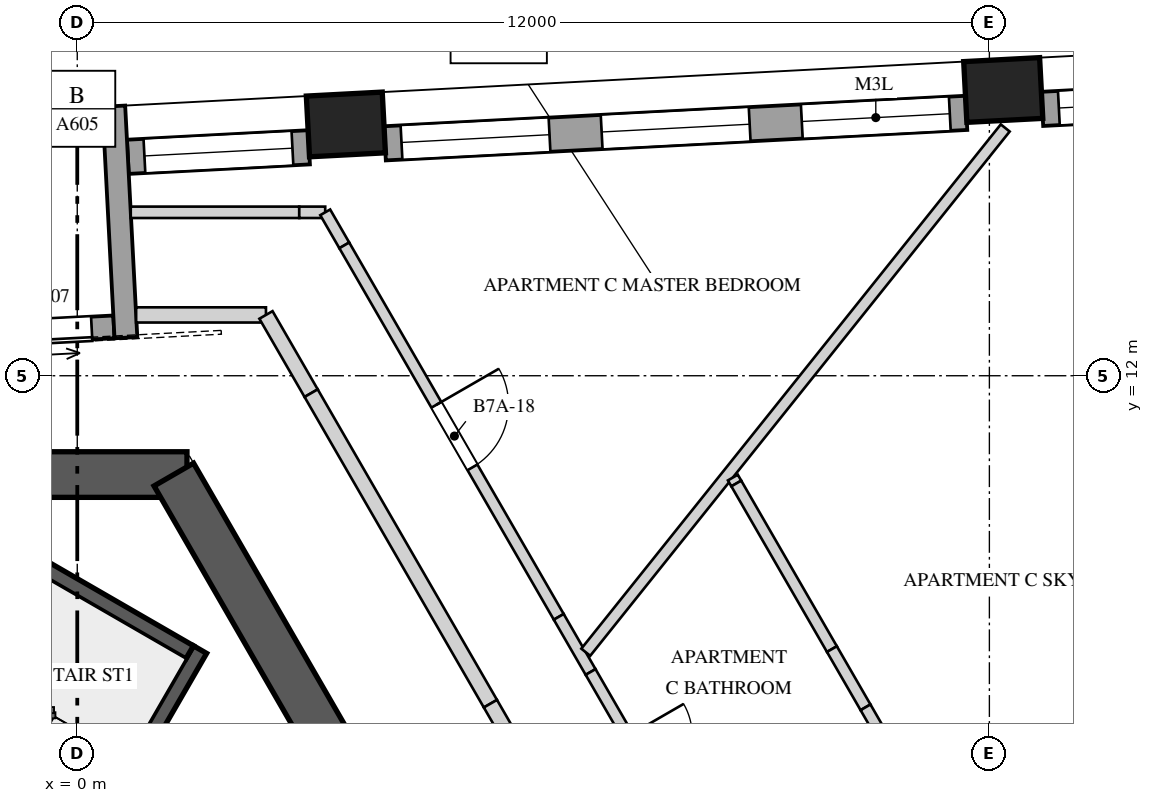
"""IFC4 building model, lengths in metres.
Left out: names, types, materials, properties, quantities, classifications, styles, units other than length and angle.
Written with IfcOpenShell. Run it as: python <this file> out.ifc"""

import sys

from ifc_helpers import new_model, si_unit, direction, frame, frame_2d, origin, origin_2d, place, context, subcontext, project, spatial, rectangle, extrude, element, fill, save


model = new_model("IFC4")
c1 = context("Model", 3, precision=1e-05, world=origin(), true_north=direction((0.0, 1.0)))
c2 = subcontext(c1, "Body", "Model", "MODEL_VIEW")
j1 = project(units=[si_unit("LENGTHUNIT", "METRE"), si_unit("PLANEANGLEUNIT", "RADIAN")], contexts=[c1])
p1 = place(None, origin())
s1 = spatial("IfcSite", under=j1, at=p1, CompositionType="ELEMENT")
p2 = place(p1, origin())
s2 = spatial("IfcBuilding", under=s1, at=p2, CompositionType="ELEMENT")
p3 = place(p2, frame((0.0, 0.0, 274.4)))
s3 = spatial("IfcBuildingStorey", under=s2, at=p3, CompositionType="ELEMENT", Elevation=274.4)
p4 = place(p3, frame((1.443, 10.7, 0.0), z_axis=(0.0, 0.0, 1.0), x_axis=(-1.0, 0.0, 0.0)))
e1 = element("IfcWall", 1, at=p4, inside=s3, PredefinedType="SHEAR", context=c2, shape_type="SweptSolid", body=[
    extrude(rectangle(XDim=2.887, YDim=0.6, at=frame_2d((1.443, 0.0))), origin(), (0.0, 0.0, 1.0), 4.0),
])
p5 = place(p3, frame((9.902, -4.25, 0.0), z_axis=(0.0, 0.0, 1.0), x_axis=(-0.499999536116, 0.866025671608, 0.0)))
e2 = element("IfcWall", 2, at=p5, inside=s3, PredefinedType="SHEAR", context=c2, shape_type="SweptSolid", body=[
    extrude(rectangle(XDim=17.263, YDim=0.6, at=frame_2d((8.631, 0.0))), origin(), (0.0, 0.0, 1.0), 4.0),
])
p6 = place(p5, frame((6.906, 0.0, 0.0)))
e3 = element("IfcOpeningElement", 3, at=p6, cuts=e2, PredefinedType="OPENING", context=c2, shape_type="SweptSolid", body=[
    extrude(rectangle(XDim=1.0, YDim=2.4, at=frame_2d((0.5, 1.2))), frame((0.0, 0.31, 0.0), z_axis=(0.0, -1.0, 0.0), x_axis=(1.0, 0.0, 0.0)), (0.0, 0.0, 1.0), 0.62),
])
for number, where, z_axis, x_axis in (
    (4, (12.182, 15.759, -0.35), (0.0, 0.0, 1.0), (-0.999, -0.052, 0.0)),
    (5, (3.534, 15.306, -0.35), (0.0, 0.0, 1.0), (-0.999, -0.052, 0.0)),
):
    element("IfcColumn", number, at=place(p3, frame(where, z_axis=z_axis, x_axis=x_axis)), inside=s3, PredefinedType="COLUMN", context=c2, shape_type="SweptSolid", body=[
        extrude(rectangle(XDim=1.0, YDim=0.8, at=origin_2d()), origin(), (0.0, 0.0, 1.0), 4.35),
    ])
p7 = place(p3, frame((15.08, 15.636, 0.0), z_axis=(0.0, 0.0, 1.0), x_axis=(-0.998627701279, -0.052370929331, 0.0)))
e6 = element("IfcWall", 6, at=p7, inside=s3, PredefinedType="SOLIDWALL", context=c2, shape_type="SweptSolid", body=[
    extrude(rectangle(XDim=2.387, YDim=0.45, at=frame_2d((1.193, 0.0))), origin(), (0.0, 0.0, 1.0), 3.3),
])
p8 = place(p7, frame((0.218, 0.0, 0.4)))
e7 = element("IfcOpeningElement", 7, at=p8, cuts=e6, PredefinedType="OPENING", context=c2, shape_type="SweptSolid", body=[
    extrude(rectangle(XDim=1.95, YDim=2.75, at=frame_2d((0.975, 1.375))), frame((0.0, 0.235, 0.0), z_axis=(0.0, -1.0, 0.0), x_axis=(1.0, 0.0, 0.0)), (0.0, 0.0, 1.0), 0.47),
])
p9 = place(p3, frame((11.697, 15.458, 0.0), z_axis=(0.0, 0.0, 1.0), x_axis=(-0.998628023429, -0.052364786088, 0.0)))
e8 = element("IfcWall", 8, at=p9, inside=s3, PredefinedType="SOLIDWALL", context=c2, shape_type="SweptSolid", body=[
    extrude(rectangle(XDim=7.66, YDim=0.45, at=frame_2d((3.83, 0.0))), origin(), (0.0, 0.0, 1.0), 3.3),
])
p10 = place(p9, frame((0.218, 0.0, 0.4)))
e9 = element("IfcOpeningElement", 9, at=p10, cuts=e8, PredefinedType="OPENING", context=c2, shape_type="SweptSolid", body=[
    extrude(rectangle(XDim=1.95, YDim=2.1, at=frame_2d((0.975, 1.05))), frame((0.0, 0.235, 0.0), z_axis=(0.0, -1.0, 0.0), x_axis=(1.0, 0.0, 0.0)), (0.0, 0.0, 1.0), 0.47),
])
p11 = place(p9, frame((2.855, 0.0, 0.4)))
e10 = element("IfcOpeningElement", 10, at=p11, cuts=e8, PredefinedType="OPENING", context=c2, shape_type="SweptSolid", body=[
    extrude(rectangle(XDim=1.95, YDim=2.75, at=frame_2d((0.975, 1.375))), frame((0.0, 0.235, 0.0), z_axis=(0.0, -1.0, 0.0), x_axis=(1.0, 0.0, 0.0)), (0.0, 0.0, 1.0), 0.47),
])
p12 = place(p9, frame((5.492, 0.0, 0.4)))
e11 = element("IfcOpeningElement", 11, at=p12, cuts=e8, PredefinedType="OPENING", context=c2, shape_type="SweptSolid", body=[
    extrude(rectangle(XDim=1.95, YDim=2.75, at=frame_2d((0.975, 1.375))), frame((0.0, 0.235, 0.0), z_axis=(0.0, -1.0, 0.0), x_axis=(1.0, 0.0, 0.0)), (0.0, 0.0, 1.0), 0.47),
])
p13 = place(p3, frame((3.049, 15.005, 0.0), z_axis=(0.0, 0.0, 1.0), x_axis=(-0.998627701279, -0.052370929331, 0.0)))
e12 = element("IfcWall", 12, at=p13, inside=s3, PredefinedType="SOLIDWALL", context=c2, shape_type="SweptSolid", body=[
    extrude(rectangle(XDim=2.387, YDim=0.45, at=frame_2d((1.193, 0.0))), origin(), (0.0, 0.0, 1.0), 3.3),
])
p14 = place(p13, frame((0.218, 0.0, 0.4)))
e13 = element("IfcOpeningElement", 13, at=p14, cuts=e12, PredefinedType="OPENING", context=c2, shape_type="SweptSolid", body=[
    extrude(rectangle(XDim=1.95, YDim=2.75, at=frame_2d((0.975, 1.375))), frame((0.0, 0.235, 0.0), z_axis=(0.0, -1.0, 0.0), x_axis=(1.0, 0.0, 0.0)), (0.0, 0.0, 1.0), 0.47),
])
p15 = place(p3, frame((0.482, 12.643, 0.0), z_axis=(0.0, 0.0, 1.0), x_axis=(-0.998630775221, -0.052312281362, 0.0)))
e14 = element("IfcWall", 14, at=p15, inside=s3, PredefinedType="SOLIDWALL", context=c2, shape_type="SweptSolid", body=[
    extrude(rectangle(XDim=2.287, YDim=0.3, at=frame_2d((1.144, 0.0))), origin(), (0.0, 0.0, 1.0), 3.3),
])
p16 = place(p15, frame((0.293, 0.0, 0.0)))
e15 = element("IfcOpeningElement", 15, at=p16, cuts=e14, PredefinedType="OPENING", context=c2, shape_type="SweptSolid", body=[
    extrude(rectangle(XDim=1.7, YDim=2.5, at=frame_2d((0.85, 1.25))), frame((0.0, 0.16, 0.0), z_axis=(0.0, -1.0, 0.0), x_axis=(1.0, 0.0, 0.0)), (0.0, 0.0, 1.0), 0.32),
])
p17 = place(p3, frame((0.48, 15.546, 0.0), z_axis=(0.0, 0.0, 1.0), x_axis=(0.052352956549, -0.998628643661, 0.0)))
e16 = element("IfcWall", 16, at=p17, inside=s3, PredefinedType="SOLIDWALL", context=c2, shape_type="SweptSolid", body=[
    extrude(rectangle(XDim=3.05, YDim=0.3, at=frame_2d((1.525, 0.0))), origin(), (0.0, 0.0, 1.0), 3.3),
])
p18 = place(p3, frame((1.615, 8.397, 0.0), z_axis=(0.0, 0.0, 1.0), x_axis=(-0.500009909098, -0.866019682689, 0.0)))
e17 = element("IfcWall", 17, at=p18, inside=s3, PredefinedType="SOLIDWALL", context=c2, shape_type="SweptSolid", body=[
    extrude(rectangle(XDim=6.2, YDim=0.2, at=frame_2d((3.1, 0.0))), origin(), (0.0, 0.0, 1.0), 3.65),
])
p19 = place(p3, frame((1.479, 8.361, 0.0), z_axis=(0.0, 0.0, 1.0), x_axis=(-0.865989465428, 0.500062241894, 0.0)))
e18 = element("IfcWall", 18, at=p19, inside=s3, PredefinedType="SOLIDWALL", context=c2, shape_type="SweptSolid", body=[
    extrude(rectangle(XDim=2.55, YDim=0.2, at=frame_2d((1.275, 0.0))), origin(), (0.0, 0.0, 1.0), 3.65),
])
p20 = place(p3, frame((0.704, 14.15, 0.0), z_axis=(0.0, 0.0, 1.0), x_axis=(1.0, 0.0, 0.0)))
e19 = element("IfcWall", 19, at=p20, inside=s3, PredefinedType="PARTITIONING", context=c2, shape_type="SweptSolid", body=[
    extrude(rectangle(XDim=2.217, YDim=0.15, at=frame_2d((1.108, 0.0))), origin(), (0.0, 0.0, 1.0), 3.65),
])
p21 = place(p3, frame((2.921, 14.15, 0.0), z_axis=(0.0, 0.0, 1.0), x_axis=(1.0, 0.0, 0.0)))
e20 = element("IfcWall", 20, at=p21, inside=s3, PredefinedType="PARTITIONING", context=c2, shape_type="SweptSolid", body=[
    extrude(rectangle(XDim=0.341, YDim=0.15, at=frame_2d((0.171, 0.0))), origin(), (0.0, 0.0, 1.0), 2.95),
])
p22 = place(p3, frame((3.262, 14.15, 0.0), z_axis=(0.0, 0.0, 1.0), x_axis=(0.500115484592, -0.865958718457, 0.0)))
e21 = element("IfcWall", 21, at=p22, inside=s3, PredefinedType="PARTITIONING", context=c2, shape_type="SweptSolid", body=[
    extrude(rectangle(XDim=0.502, YDim=0.15, at=frame_2d((0.251, 0.0))), origin(), (0.0, 0.0, 1.0), 2.95),
])
p23 = place(p3, frame((3.513, 13.715, 0.0), z_axis=(0.0, 0.0, 1.0), x_axis=(0.500019542665, -0.866014120528, 0.0)))
e22 = element("IfcWall", 22, at=p23, inside=s3, PredefinedType="PARTITIONING", context=c2, shape_type="SweptSolid", body=[
    extrude(rectangle(XDim=5.643, YDim=0.15, at=frame_2d((2.822, 0.0))), origin(), (0.0, 0.0, 1.0), 3.65),
])
p24 = place(p23, frame((2.422, 0.0, 0.0)))
e23 = element("IfcOpeningElement", 23, at=p24, cuts=e22, PredefinedType="OPENING", context=c2, shape_type="SweptSolid", body=[
    extrude(rectangle(XDim=0.95, YDim=2.4, at=frame_2d((0.475, 1.2))), frame((0.0, 0.085, 0.0), z_axis=(0.0, -1.0, 0.0), x_axis=(1.0, 0.0, 0.0)), (0.0, 0.0, 1.0), 0.17),
])
p25 = place(p3, frame((6.335, 8.828, 0.0), z_axis=(0.0, 0.0, 1.0), x_axis=(0.499932737185, -0.866064234506, 0.0)))
e24 = element("IfcWall", 24, at=p25, inside=s3, PredefinedType="PARTITIONING", context=c2, shape_type="SweptSolid", body=[
    extrude(rectangle(XDim=0.837, YDim=0.15, at=frame_2d((0.419, 0.0))), origin(), (0.0, 0.0, 1.0), 2.75),
])
p26 = place(p3, frame((6.753, 8.103, 0.0), z_axis=(0.0, 0.0, 1.0), x_axis=(0.499882215713, -0.866093395895, 0.0)))
e25 = element("IfcWall", 25, at=p26, inside=s3, PredefinedType="PARTITIONING", context=c2, shape_type="SweptSolid", body=[
    extrude(rectangle(XDim=0.926, YDim=0.15, at=frame_2d((0.463, 0.0))), origin(), (0.0, 0.0, 1.0), 3.65),
])
p27 = place(p3, frame((6.69, 8.362, 0.0), z_axis=(0.0, 0.0, 1.0), x_axis=(0.624718641323, 0.780849933843, 0.0)))
e26 = element("IfcWall", 26, at=p27, inside=s3, PredefinedType="PARTITIONING", context=c2, shape_type="SweptSolid", body=[
    extrude(rectangle(XDim=8.833, YDim=0.15, at=frame_2d((4.417, 0.0))), origin(), (0.0, 0.0, 1.0), 2.75),
])
p28 = place(p3, frame((8.625, 10.661, 0.0), z_axis=(0.0, 0.0, 1.0), x_axis=(0.499332966107, -0.866410173624, 0.0)))
e27 = element("IfcWall", 27, at=p28, inside=s3, PredefinedType="PARTITIONING", context=c2, shape_type="SweptSolid", body=[
    extrude(rectangle(XDim=0.09, YDim=0.15, at=frame_2d((0.045, 0.0))), origin(), (0.0, 0.0, 1.0), 2.75),
])
p29 = place(p3, frame((8.67, 10.583, 0.0), z_axis=(0.0, 0.0, 1.0), x_axis=(0.499938053331, -0.866061165757, 0.0)))
e28 = element("IfcWall", 28, at=p29, inside=s3, PredefinedType="PARTITIONING", context=c2, shape_type="SweptSolid", body=[
    extrude(rectangle(XDim=2.516, YDim=0.15, at=frame_2d((1.258, 0.0))), origin(), (0.0, 0.0, 1.0), 3.65),
])
p30 = place(p3, frame((9.928, 8.404, 0.0), z_axis=(0.0, 0.0, 1.0), x_axis=(0.500176418896, -0.865923524325, 0.0)))
e29 = element("IfcWall", 29, at=p30, inside=s3, PredefinedType="PARTITIONING", context=c2, shape_type="SweptSolid", body=[
    extrude(rectangle(XDim=0.885, YDim=0.15, at=frame_2d((0.442, 0.0))), origin(), (0.0, 0.0, 1.0), 2.55),
])
p31 = place(p3, frame((10.371, 7.638, 0.0), z_axis=(0.0, 0.0, 1.0), x_axis=(0.499983823482, -0.8660347431, 0.0)))
e30 = element("IfcWall", 30, at=p31, inside=s3, PredefinedType="PARTITIONING", context=c2, shape_type="SweptSolid", body=[
    extrude(rectangle(XDim=1.509, YDim=0.15, at=frame_2d((0.755, 0.0))), origin(), (0.0, 0.0, 1.0), 3.65),
])
p32 = place(p3, frame((0.775, 12.8, 0.0), z_axis=(0.0, 0.0, 1.0), x_axis=(1.0, 0.0, 0.0)))
e31 = element("IfcWall", 31, at=p32, inside=s3, PredefinedType="SOLIDWALL", context=c2, shape_type="SweptSolid", body=[
    extrude(rectangle(XDim=1.708, YDim=0.2, at=frame_2d((0.854, 0.0))), origin(), (0.0, 0.0, 1.0), 3.65),
])
p33 = place(p3, frame((2.483, 12.8, 0.0), z_axis=(0.0, 0.0, 1.0), x_axis=(0.499983247966, -0.86603507536, 0.0)))
e32 = element("IfcWall", 32, at=p33, inside=s3, PredefinedType="SOLIDWALL", context=c2, shape_type="SweptSolid", body=[
    extrude(rectangle(XDim=1.188, YDim=0.2, at=frame_2d((0.594, 0.0))), origin(), (0.0, 0.0, 1.0), 2.95),
])
p34 = place(p3, frame((3.077, 11.771, 0.0), z_axis=(0.0, 0.0, 1.0), x_axis=(0.500007683529, -0.866020967652, 0.0)))
e33 = element("IfcWall", 33, at=p34, inside=s3, PredefinedType="SOLIDWALL", context=c2, shape_type="SweptSolid", body=[
    extrude(rectangle(XDim=4.717, YDim=0.2, at=frame_2d((2.359, 0.0))), origin(), (0.0, 0.0, 1.0), 3.65),
])
p35 = place(p3, frame((5.436, 7.686, 0.0), z_axis=(0.0, 0.0, 1.0), x_axis=(0.500056482814, -0.86599279096, 0.0)))
e34 = element("IfcWall", 34, at=p35, inside=s3, PredefinedType="SOLIDWALL", context=c2, shape_type="SweptSolid", body=[
    extrude(rectangle(XDim=0.865, YDim=0.2, at=frame_2d((0.432, 0.0))), origin(), (0.0, 0.0, 1.0), 2.75),
])
p36 = place(p8, origin())
e35 = element("IfcWindow", 35, at=p36, inside=s3, PartitioningType="SINGLE_PANEL", PredefinedType="WINDOW", context=c2, shape_type="SweptSolid", body=[
    extrude(rectangle(XDim=1.95, YDim=2.75, at=frame_2d((0.975, 1.375))), frame((0.0, 0.03, 0.0), z_axis=(0.0, -1.0, 0.0), x_axis=(1.0, 0.0, 0.0)), (0.0, 0.0, 1.0), 0.06),
])
fill(e7, e35)
p37 = place(p10, origin())
e36 = element("IfcWindow", 36, at=p37, inside=s3, PartitioningType="SINGLE_PANEL", PredefinedType="WINDOW", context=c2, shape_type="SweptSolid", body=[
    extrude(rectangle(XDim=1.95, YDim=2.1, at=frame_2d((0.975, 1.05))), frame((0.0, 0.03, 0.0), z_axis=(0.0, -1.0, 0.0), x_axis=(1.0, 0.0, 0.0)), (0.0, 0.0, 1.0), 0.06),
])
fill(e9, e36)
p38 = place(p11, origin())
e37 = element("IfcWindow", 37, at=p38, inside=s3, PartitioningType="SINGLE_PANEL", PredefinedType="WINDOW", context=c2, shape_type="SweptSolid", body=[
    extrude(rectangle(XDim=1.95, YDim=2.75, at=frame_2d((0.975, 1.375))), frame((0.0, 0.03, 0.0), z_axis=(0.0, -1.0, 0.0), x_axis=(1.0, 0.0, 0.0)), (0.0, 0.0, 1.0), 0.06),
])
fill(e10, e37)
p39 = place(p12, origin())
e38 = element("IfcWindow", 38, at=p39, inside=s3, PartitioningType="SINGLE_PANEL", PredefinedType="WINDOW", context=c2, shape_type="SweptSolid", body=[
    extrude(rectangle(XDim=1.95, YDim=2.75, at=frame_2d((0.975, 1.375))), frame((0.0, 0.03, 0.0), z_axis=(0.0, -1.0, 0.0), x_axis=(1.0, 0.0, 0.0)), (0.0, 0.0, 1.0), 0.06),
])
fill(e11, e38)
p40 = place(p14, origin())
e39 = element("IfcWindow", 39, at=p40, inside=s3, PartitioningType="SINGLE_PANEL", PredefinedType="WINDOW", context=c2, shape_type="SweptSolid", body=[
    extrude(rectangle(XDim=1.95, YDim=2.75, at=frame_2d((0.975, 1.375))), frame((0.0, 0.03, 0.0), z_axis=(0.0, -1.0, 0.0), x_axis=(1.0, 0.0, 0.0)), (0.0, 0.0, 1.0), 0.06),
])
fill(e13, e39)
p41 = place(p16, origin())
e40 = element("IfcDoor", 40, at=p41, inside=s3, OperationType="SLIDING_TO_LEFT", PredefinedType="DOOR", context=c2, shape_type="SweptSolid", body=[
    extrude(rectangle(XDim=1.7, YDim=2.5, at=frame_2d((0.85, 1.25))), frame((0.0, 0.025, 0.0), z_axis=(0.0, -1.0, 0.0), x_axis=(1.0, 0.0, 0.0)), (0.0, 0.0, 1.0), 0.05),
])
fill(e15, e40)
p42 = place(p24, origin())
e41 = element("IfcDoor", 41, at=p42, inside=s3, OperationType="SINGLE_SWING_RIGHT", PredefinedType="DOOR", context=c2, shape_type="SweptSolid", body=[
    extrude(rectangle(XDim=0.95, YDim=2.4, at=frame_2d((0.475, 1.2))), frame((0.0, 0.025, 0.0), z_axis=(0.0, -1.0, 0.0), x_axis=(1.0, 0.0, 0.0)), (0.0, 0.0, 1.0), 0.05),
])
fill(e23, e41)
save(model, sys.argv[1])
